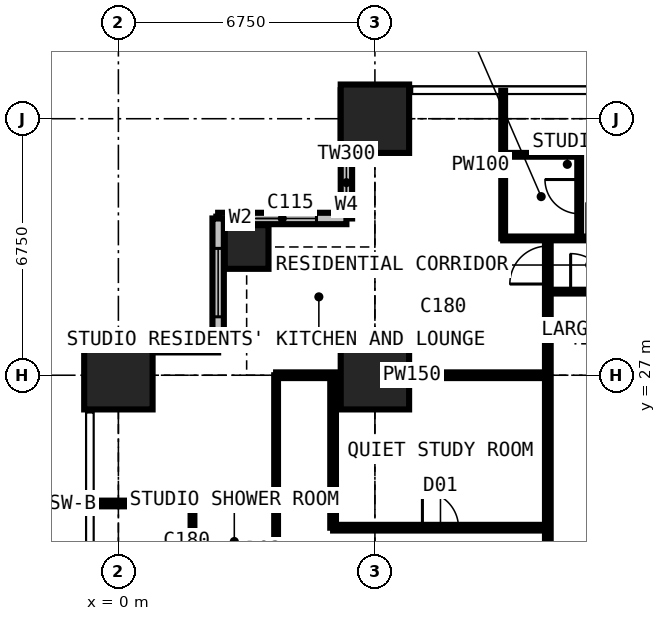
"""IFC4 building model, lengths in metres.
Left out: names, types, materials, properties, quantities, classifications, styles, units other than length and angle.
Written with IfcOpenShell. Run it as: python <this file> out.ifc"""

import sys

from ifc_helpers import new_model, si_unit, direction, frame, frame_2d, origin, origin_2d, place, context, subcontext, project, spatial, rectangle, extrude, element, fill, save


model = new_model("IFC4")
c1 = context("Model", 3, precision=1e-05, world=origin(), true_north=direction((0.0, 1.0)))
c2 = subcontext(c1, "Body", "Model", "MODEL_VIEW")
j1 = project(units=[si_unit("LENGTHUNIT", "METRE"), si_unit("PLANEANGLEUNIT", "RADIAN")], contexts=[c1])
p1 = place(None, origin())
s1 = spatial("IfcSite", under=j1, at=p1, CompositionType="ELEMENT")
p2 = place(p1, origin())
s2 = spatial("IfcBuilding", under=s1, at=p2, CompositionType="ELEMENT")
p3 = place(p2, frame((0.0, 0.0, 98.1)))
s3 = spatial("IfcBuildingStorey", under=s2, at=p3, CompositionType="ELEMENT", Elevation=98.1)
p4 = place(p3, frame((0.0, 27.0, 0.0), z_axis=(0.0, 0.0, 1.0), x_axis=(1.0, 0.0, 0.0)))
e1 = element("IfcColumn", 1, at=p4, inside=s3, PredefinedType="COLUMN", context=c2, shape_type="SweptSolid", body=[
    extrude(rectangle(XDim=1.8, YDim=1.8, at=origin_2d()), origin(), (0.0, 0.0, 1.0), 3.6),
])
p5 = place(p3, frame((3.375, 30.375, 0.0), z_axis=(0.0, 0.0, 1.0), x_axis=(1.0, 0.0, 0.0)))
e2 = element("IfcColumn", 2, at=p5, inside=s3, PredefinedType="COLUMN", context=c2, shape_type="SweptSolid", body=[
    extrude(rectangle(XDim=1.15, YDim=1.15, at=origin_2d()), origin(), (0.0, 0.0, 1.0), 3.6),
])
for number, where, z_axis, x_axis in (
    (3, (6.75, 27.0, 0.0), (0.0, 0.0, 1.0), (1.0, 0.0, 0.0)),
    (4, (6.75, 33.75, 0.0), (0.0, 0.0, 1.0), (1.0, 0.0, 0.0)),
):
    element("IfcColumn", number, at=place(p3, frame(where, z_axis=z_axis, x_axis=x_axis)), inside=s3, PredefinedType="COLUMN", context=c2, shape_type="SweptSolid", body=[
        extrude(rectangle(XDim=1.8, YDim=1.8, at=origin_2d()), origin(), (0.0, 0.0, 1.0), 3.6),
    ])
p6 = place(p3, frame((6.0, 34.5, 0.0), z_axis=(0.0, 0.0, 1.0), x_axis=(0.0, -1.0, 0.0)))
e5 = element("IfcWall", 5, at=p6, inside=s3, PredefinedType="SOLIDWALL", context=c2, shape_type="SweptSolid", body=[
    extrude(rectangle(XDim=3.375, YDim=0.3, at=frame_2d((1.688, 0.0))), origin(), (0.0, 0.0, 1.0), 3.375),
])
p7 = place(p6, frame((1.833, 0.0, 0.9)))
e6 = element("IfcOpeningElement", 6, at=p7, cuts=e5, PredefinedType="OPENING", context=c2, shape_type="SweptSolid", body=[
    extrude(rectangle(XDim=1.2, YDim=1.8, at=frame_2d((0.6, 0.9))), frame((0.0, 0.16, 0.0), z_axis=(0.0, -1.0, 0.0), x_axis=(1.0, 0.0, 0.0)), (0.0, 0.0, 1.0), 0.32),
])
p8 = place(p3, frame((6.0, 31.125, 0.0), z_axis=(0.0, 0.0, 1.0), x_axis=(-1.0, 0.0, 0.0)))
e7 = element("IfcWall", 7, at=p8, inside=s3, PredefinedType="SOLIDWALL", context=c2, shape_type="SweptSolid", body=[
    extrude(rectangle(XDim=3.375, YDim=0.3, at=frame_2d((1.688, 0.0))), origin(), (0.0, 0.0, 1.0), 3.375),
])
p9 = place(p8, frame((0.788, 0.0, 0.6)))
e8 = element("IfcOpeningElement", 8, at=p9, cuts=e7, PredefinedType="OPENING", context=c2, shape_type="SweptSolid", body=[
    extrude(rectangle(XDim=1.8, YDim=2.1, at=frame_2d((0.9, 1.05))), frame((0.0, 0.16, 0.0), z_axis=(0.0, -1.0, 0.0), x_axis=(1.0, 0.0, 0.0)), (0.0, 0.0, 1.0), 0.32),
])
p10 = place(p3, frame((2.625, 31.125, 0.0), z_axis=(0.0, 0.0, 1.0), x_axis=(0.0, -1.0, 0.0)))
e9 = element("IfcWall", 9, at=p10, inside=s3, PredefinedType="SOLIDWALL", context=c2, shape_type="SweptSolid", body=[
    extrude(rectangle(XDim=3.375, YDim=0.3, at=frame_2d((1.688, 0.0))), origin(), (0.0, 0.0, 1.0), 3.375),
])
p11 = place(p10, frame((0.788, 0.0, 0.6)))
e10 = element("IfcOpeningElement", 10, at=p11, cuts=e9, PredefinedType="OPENING", context=c2, shape_type="SweptSolid", body=[
    extrude(rectangle(XDim=1.8, YDim=2.1, at=frame_2d((0.9, 1.05))), frame((0.0, 0.16, 0.0), z_axis=(0.0, -1.0, 0.0), x_axis=(1.0, 0.0, 0.0)), (0.0, 0.0, 1.0), 0.32),
])
p12 = place(p3, frame((2.625, 27.75, 0.0), z_axis=(0.0, 0.0, 1.0), x_axis=(-1.0, 0.0, 0.0)))
e11 = element("IfcWall", 11, at=p12, inside=s3, PredefinedType="SOLIDWALL", context=c2, shape_type="SweptSolid", body=[
    extrude(rectangle(XDim=3.375, YDim=0.3, at=frame_2d((1.688, 0.0))), origin(), (0.0, 0.0, 1.0), 3.375),
])
p13 = place(p12, frame((0.343, 0.0, 0.9)))
e12 = element("IfcOpeningElement", 12, at=p13, cuts=e11, PredefinedType="OPENING", context=c2, shape_type="SweptSolid", body=[
    extrude(rectangle(XDim=1.2, YDim=1.8, at=frame_2d((0.6, 0.9))), frame((0.0, 0.16, 0.0), z_axis=(0.0, -1.0, 0.0), x_axis=(1.0, 0.0, 0.0)), (0.0, 0.0, 1.0), 0.32),
])
p14 = place(p3, frame((-0.734, 23.625, 0.0), z_axis=(0.0, 0.0, 1.0), x_axis=(1.0, 0.0, 0.0)))
e13 = element("IfcWall", 13, at=p14, inside=s3, PredefinedType="PARTITIONING", context=c2, shape_type="SweptSolid", body=[
    extrude(rectangle(XDim=4.884, YDim=0.15, at=frame_2d((2.442, 0.0))), origin(), (0.0, 0.0, 1.0), 3.375),
])
p15 = place(p3, frame((1.95, 21.625, 0.0), z_axis=(0.0, 0.0, 1.0), x_axis=(0.0, 1.0, 0.0)))
e14 = element("IfcWall", 14, at=p15, inside=s3, PredefinedType="PARTITIONING", context=c2, shape_type="SweptSolid", body=[
    extrude(rectangle(XDim=2.0, YDim=0.1, at=frame_2d((1.0, 0.0))), origin(), (0.0, 0.0, 1.0), 3.375),
])
p16 = place(p3, frame((4.15, 10.125, 0.0), z_axis=(0.0, 0.0, 1.0), x_axis=(0.0, 1.0, 0.0)))
e15 = element("IfcWall", 15, at=p16, inside=s3, PredefinedType="PARTITIONING", context=c2, shape_type="SweptSolid", body=[
    extrude(rectangle(XDim=16.875, YDim=0.1, at=frame_2d((8.438, 0.0))), origin(), (0.0, 0.0, 1.0), 3.375),
])
p17 = place(p16, frame((0.2, 0.0, 0.0)))
e16 = element("IfcOpeningElement", 16, at=p17, cuts=e15, PredefinedType="OPENING", context=c2, shape_type="SweptSolid", body=[
    extrude(rectangle(XDim=0.95, YDim=2.2, at=frame_2d((0.475, 1.1))), frame((0.0, 0.06, 0.0), z_axis=(0.0, -1.0, 0.0), x_axis=(1.0, 0.0, 0.0)), (0.0, 0.0, 1.0), 0.12),
])
p18 = place(p16, frame((3.625, 0.0, 0.0)))
e17 = element("IfcOpeningElement", 17, at=p18, cuts=e15, PredefinedType="OPENING", context=c2, shape_type="SweptSolid", body=[
    extrude(rectangle(XDim=0.95, YDim=2.2, at=frame_2d((0.475, 1.1))), frame((0.0, 0.06, 0.0), z_axis=(0.0, -1.0, 0.0), x_axis=(1.0, 0.0, 0.0)), (0.0, 0.0, 1.0), 0.12),
])
p19 = place(p16, frame((7.0, 0.0, 0.0)))
e18 = element("IfcOpeningElement", 18, at=p19, cuts=e15, PredefinedType="OPENING", context=c2, shape_type="SweptSolid", body=[
    extrude(rectangle(XDim=0.95, YDim=2.2, at=frame_2d((0.475, 1.1))), frame((0.0, 0.06, 0.0), z_axis=(0.0, -1.0, 0.0), x_axis=(1.0, 0.0, 0.0)), (0.0, 0.0, 1.0), 0.12),
])
p20 = place(p16, frame((10.375, 0.0, 0.0)))
e19 = element("IfcOpeningElement", 19, at=p20, cuts=e15, PredefinedType="OPENING", context=c2, shape_type="SweptSolid", body=[
    extrude(rectangle(XDim=0.95, YDim=2.2, at=frame_2d((0.475, 1.1))), frame((0.0, 0.06, 0.0), z_axis=(0.0, -1.0, 0.0), x_axis=(1.0, 0.0, 0.0)), (0.0, 0.0, 1.0), 0.12),
])
p21 = place(p3, frame((4.15, 27.0, 0.0), z_axis=(0.0, 0.0, 1.0), x_axis=(1.0, 0.0, 0.0)))
e20 = element("IfcWall", 20, at=p21, inside=s3, PredefinedType="PARTITIONING", context=c2, shape_type="SweptSolid", body=[
    extrude(rectangle(XDim=7.15, YDim=0.15, at=frame_2d((3.575, 0.0))), origin(), (0.0, 0.0, 1.0), 2.806),
])
p22 = place(p3, frame((5.65, 22.988, 0.0), z_axis=(0.0, 0.0, 1.0), x_axis=(0.0, 1.0, 0.0)))
e21 = element("IfcWall", 21, at=p22, inside=s3, PredefinedType="PARTITIONING", context=c2, shape_type="SweptSolid", body=[
    extrude(rectangle(XDim=4.012, YDim=0.15, at=frame_2d((2.006, 0.0))), origin(), (0.0, 0.0, 1.0), 3.375),
])
p23 = place(p3, frame((5.65, 22.988, 0.0), z_axis=(0.0, 0.0, 1.0), x_axis=(1.0, 0.0, 0.0)))
e22 = element("IfcWall", 22, at=p23, inside=s3, PredefinedType="PARTITIONING", context=c2, shape_type="SweptSolid", body=[
    extrude(rectangle(XDim=5.65, YDim=0.15, at=frame_2d((2.825, 0.0))), origin(), (0.0, 0.0, 1.0), 3.375),
])
p24 = place(p23, frame((2.35, 0.0, 0.0)))
e23 = element("IfcOpeningElement", 23, at=p24, cuts=e22, PredefinedType="OPENING", context=c2, shape_type="SweptSolid", body=[
    extrude(rectangle(XDim=0.95, YDim=2.2, at=frame_2d((0.475, 1.1))), frame((0.0, 0.085, 0.0), z_axis=(0.0, -1.0, 0.0), x_axis=(1.0, 0.0, 0.0)), (0.0, 0.0, 1.0), 0.17),
])
p25 = place(p3, frame((10.125, 30.6, 0.0), z_axis=(0.0, 0.0, 1.0), x_axis=(0.0, 1.0, 0.0)))
e24 = element("IfcWall", 24, at=p25, inside=s3, PredefinedType="PARTITIONING", context=c2, shape_type="SweptSolid", body=[
    extrude(rectangle(XDim=3.884, YDim=0.1, at=frame_2d((1.942, 0.0))), origin(), (0.0, 0.0, 1.0), 3.375),
])
p26 = place(p3, frame((10.125, 30.6, 0.0), z_axis=(0.0, 0.0, 1.0), x_axis=(1.0, 0.0, 0.0)))
e25 = element("IfcWall", 25, at=p26, inside=s3, PredefinedType="PARTITIONING", context=c2, shape_type="SweptSolid", body=[
    extrude(rectangle(XDim=3.375, YDim=0.1, at=frame_2d((1.688, 0.0))), origin(), (0.0, 0.0, 1.0), 3.375),
])
p27 = place(p26, frame((2.2, 0.0, 0.0)))
e26 = element("IfcOpeningElement", 26, at=p27, cuts=e25, PredefinedType="OPENING", context=c2, shape_type="SweptSolid", body=[
    extrude(rectangle(XDim=0.95, YDim=2.2, at=frame_2d((0.475, 1.1))), frame((0.0, 0.06, 0.0), z_axis=(0.0, -1.0, 0.0), x_axis=(1.0, 0.0, 0.0)), (0.0, 0.0, 1.0), 0.12),
])
p28 = place(p3, frame((10.125, 32.8, 0.0), z_axis=(0.0, 0.0, 1.0), x_axis=(1.0, 0.0, 0.0)))
e27 = element("IfcWall", 27, at=p28, inside=s3, PredefinedType="PARTITIONING", context=c2, shape_type="SweptSolid", body=[
    extrude(rectangle(XDim=2.0, YDim=0.1, at=frame_2d((1.0, 0.0))), origin(), (0.0, 0.0, 1.0), 3.375),
])
p29 = place(p3, frame((11.3, 11.3, 0.0), z_axis=(0.0, 0.0, 1.0), x_axis=(0.0, 1.0, 0.0)))
e28 = element("IfcWall", 28, at=p29, inside=s3, PredefinedType="PARTITIONING", context=c2, shape_type="SweptSolid", body=[
    extrude(rectangle(XDim=19.3, YDim=0.15, at=frame_2d((9.65, 0.0))), origin(), (0.0, 0.0, 1.0), 3.375),
])
p30 = place(p29, frame((18.1, 0.0, 0.0)))
e29 = element("IfcOpeningElement", 29, at=p30, cuts=e28, PredefinedType="OPENING", context=c2, shape_type="SweptSolid", body=[
    extrude(rectangle(XDim=1.0, YDim=2.2, at=frame_2d((0.5, 1.1))), frame((0.0, 0.085, 0.0), z_axis=(0.0, -1.0, 0.0), x_axis=(1.0, 0.0, 0.0)), (0.0, 0.0, 1.0), 0.17),
])
p31 = place(p29, frame((10.137, 0.0, 0.0)))
e30 = element("IfcOpeningElement", 30, at=p31, cuts=e28, PredefinedType="OPENING", context=c2, shape_type="SweptSolid", body=[
    extrude(rectangle(XDim=1.0, YDim=2.2, at=frame_2d((0.5, 1.1))), frame((0.0, 0.085, 0.0), z_axis=(0.0, -1.0, 0.0), x_axis=(1.0, 0.0, 0.0)), (0.0, 0.0, 1.0), 0.17),
])
p32 = place(p3, frame((11.3, 29.2, 0.0), z_axis=(0.0, 0.0, 1.0), x_axis=(1.0, 0.0, 0.0)))
e31 = element("IfcWall", 31, at=p32, inside=s3, PredefinedType="PARTITIONING", context=c2, shape_type="SweptSolid", body=[
    extrude(rectangle(XDim=19.075, YDim=0.1, at=frame_2d((9.538, 0.0))), origin(), (0.0, 0.0, 1.0), 3.375),
])
p33 = place(p32, frame((6.4, 0.0, 0.0)))
e32 = element("IfcOpeningElement", 32, at=p33, cuts=e31, PredefinedType="OPENING", context=c2, shape_type="SweptSolid", body=[
    extrude(rectangle(XDim=0.95, YDim=2.2, at=frame_2d((0.475, 1.1))), frame((0.0, 0.06, 0.0), z_axis=(0.0, -1.0, 0.0), x_axis=(1.0, 0.0, 0.0)), (0.0, 0.0, 1.0), 0.12),
])
p34 = place(p32, frame((13.15, 0.0, 0.0)))
e33 = element("IfcOpeningElement", 33, at=p34, cuts=e31, PredefinedType="OPENING", context=c2, shape_type="SweptSolid", body=[
    extrude(rectangle(XDim=0.95, YDim=2.2, at=frame_2d((0.475, 1.1))), frame((0.0, 0.06, 0.0), z_axis=(0.0, -1.0, 0.0), x_axis=(1.0, 0.0, 0.0)), (0.0, 0.0, 1.0), 0.12),
])
p35 = place(p32, frame((0.6, 0.0, 0.0)))
e34 = element("IfcOpeningElement", 34, at=p35, cuts=e31, PredefinedType="OPENING", context=c2, shape_type="SweptSolid", body=[
    extrude(rectangle(XDim=1.0, YDim=2.2, at=frame_2d((0.5, 1.1))), frame((0.0, 0.06, 0.0), z_axis=(0.0, -1.0, 0.0), x_axis=(1.0, 0.0, 0.0)), (0.0, 0.0, 1.0), 0.12),
])
p36 = place(p3, frame((12.125, 30.6, 0.0), z_axis=(0.0, 0.0, 1.0), x_axis=(0.0, 1.0, 0.0)))
e35 = element("IfcWall", 35, at=p36, inside=s3, PredefinedType="PARTITIONING", context=c2, shape_type="SweptSolid", body=[
    extrude(rectangle(XDim=2.2, YDim=0.1, at=frame_2d((1.1, 0.0))), origin(), (0.0, 0.0, 1.0), 3.375),
])
p37 = place(p36, frame((0.65, 0.0, 0.0)))
e36 = element("IfcOpeningElement", 36, at=p37, cuts=e35, PredefinedType="OPENING", context=c2, shape_type="SweptSolid", body=[
    extrude(rectangle(XDim=0.9, YDim=2.2, at=frame_2d((0.45, 1.1))), frame((0.0, 0.06, 0.0), z_axis=(0.0, -1.0, 0.0), x_axis=(1.0, 0.0, 0.0)), (0.0, 0.0, 1.0), 0.12),
])
p38 = place(p7, origin())
e37 = element("IfcWindow", 37, at=p38, inside=s3, PartitioningType="SINGLE_PANEL", PredefinedType="WINDOW", context=c2, shape_type="SweptSolid", body=[
    extrude(rectangle(XDim=1.2, YDim=1.8, at=frame_2d((0.6, 0.9))), frame((0.0, 0.03, 0.0), z_axis=(0.0, -1.0, 0.0), x_axis=(1.0, 0.0, 0.0)), (0.0, 0.0, 1.0), 0.06),
])
fill(e6, e37)
p39 = place(p9, origin())
e38 = element("IfcWindow", 38, at=p39, inside=s3, PartitioningType="SINGLE_PANEL", PredefinedType="WINDOW", context=c2, shape_type="SweptSolid", body=[
    extrude(rectangle(XDim=1.8, YDim=2.1, at=frame_2d((0.9, 1.05))), frame((0.0, 0.03, 0.0), z_axis=(0.0, -1.0, 0.0), x_axis=(1.0, 0.0, 0.0)), (0.0, 0.0, 1.0), 0.06),
])
fill(e8, e38)
p40 = place(p11, origin())
e39 = element("IfcWindow", 39, at=p40, inside=s3, PartitioningType="SINGLE_PANEL", PredefinedType="WINDOW", context=c2, shape_type="SweptSolid", body=[
    extrude(rectangle(XDim=1.8, YDim=2.1, at=frame_2d((0.9, 1.05))), frame((0.0, 0.03, 0.0), z_axis=(0.0, -1.0, 0.0), x_axis=(1.0, 0.0, 0.0)), (0.0, 0.0, 1.0), 0.06),
])
fill(e10, e39)
p41 = place(p13, origin())
e40 = element("IfcWindow", 40, at=p41, inside=s3, PartitioningType="SINGLE_PANEL", PredefinedType="WINDOW", context=c2, shape_type="SweptSolid", body=[
    extrude(rectangle(XDim=1.2, YDim=1.8, at=frame_2d((0.6, 0.9))), frame((0.0, 0.03, 0.0), z_axis=(0.0, -1.0, 0.0), x_axis=(1.0, 0.0, 0.0)), (0.0, 0.0, 1.0), 0.06),
])
fill(e12, e40)
p42 = place(p37, origin())
e41 = element("IfcDoor", 41, at=p42, inside=s3, OperationType="SINGLE_SWING_RIGHT", PredefinedType="DOOR", context=c2, shape_type="SweptSolid", body=[
    extrude(rectangle(XDim=0.9, YDim=2.2, at=frame_2d((0.45, 1.1))), frame((0.0, 0.025, 0.0), z_axis=(0.0, -1.0, 0.0), x_axis=(1.0, 0.0, 0.0)), (0.0, 0.0, 1.0), 0.05),
])
fill(e36, e41)
p43 = place(p35, origin())
e42 = element("IfcDoor", 42, at=p43, inside=s3, OperationType="SINGLE_SWING_LEFT", PredefinedType="DOOR", context=c2, shape_type="SweptSolid", body=[
    extrude(rectangle(XDim=1.0, YDim=2.2, at=frame_2d((0.5, 1.1))), frame((0.0, 0.025, 0.0), z_axis=(0.0, -1.0, 0.0), x_axis=(1.0, 0.0, 0.0)), (0.0, 0.0, 1.0), 0.05),
])
fill(e34, e42)
p44 = place(p30, origin())
e43 = element("IfcDoor", 43, at=p44, inside=s3, OperationType="SINGLE_SWING_LEFT", PredefinedType="DOOR", context=c2, shape_type="SweptSolid", body=[
    extrude(rectangle(XDim=1.0, YDim=2.2, at=frame_2d((0.5, 1.1))), frame((0.0, 0.025, 0.0), z_axis=(0.0, -1.0, 0.0), x_axis=(1.0, 0.0, 0.0)), (0.0, 0.0, 1.0), 0.05),
])
fill(e29, e43)
p45 = place(p24, origin())
e44 = element("IfcDoor", 44, at=p45, inside=s3, OperationType="SINGLE_SWING_LEFT", PredefinedType="DOOR", context=c2, shape_type="SweptSolid", body=[
    extrude(rectangle(XDim=0.95, YDim=2.2, at=frame_2d((0.475, 1.1))), frame((0.0, 0.025, 0.0), z_axis=(0.0, -1.0, 0.0), x_axis=(1.0, 0.0, 0.0)), (0.0, 0.0, 1.0), 0.05),
])
fill(e23, e44)
save(model, sys.argv[1])
